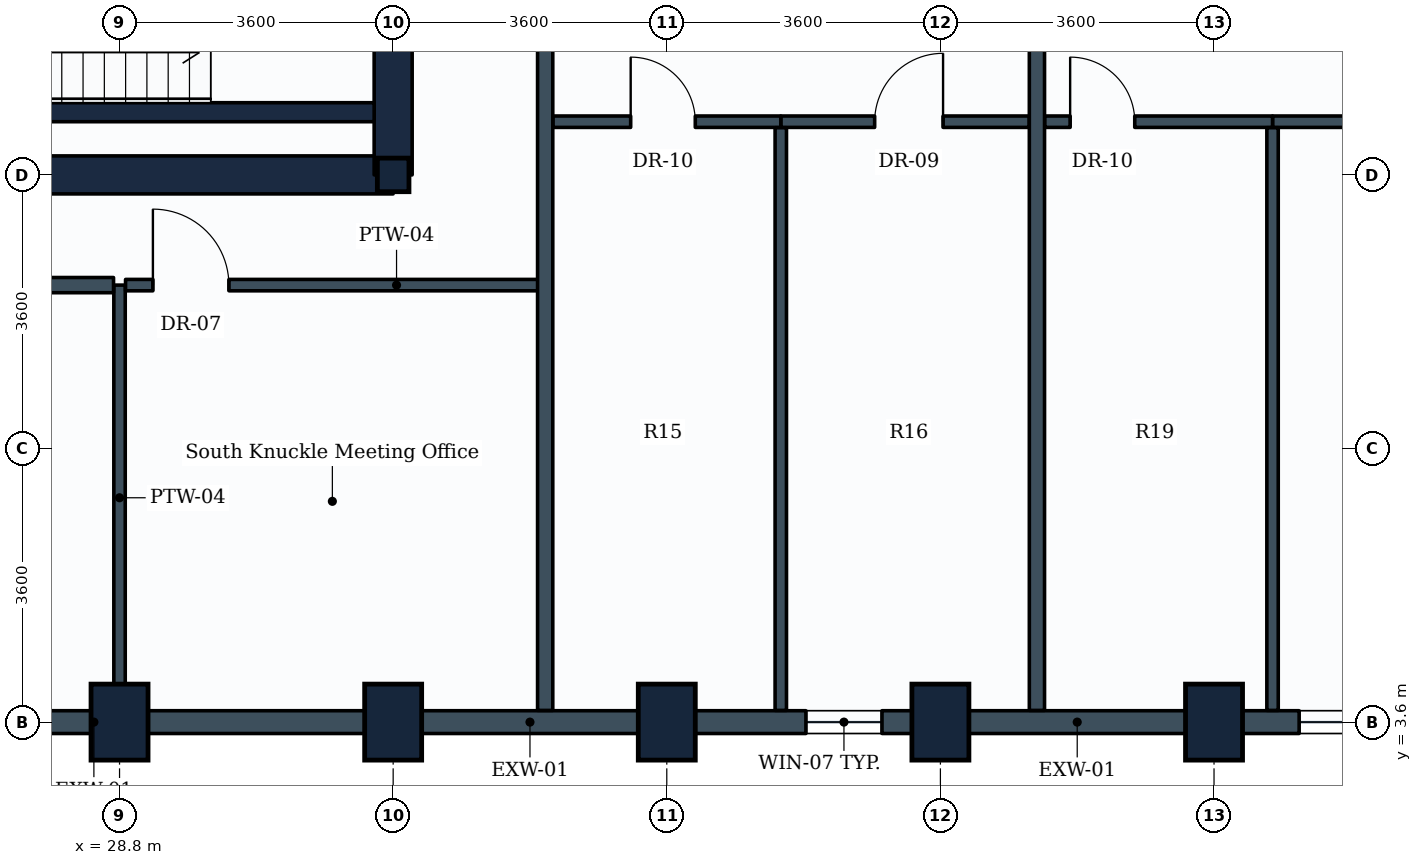
"""IFC4 building model, lengths in metres.
Left out: names, types, materials, properties, quantities, classifications, styles, units other than length and angle.
Written with IfcOpenShell. Run it as: python <this file> out.ifc"""

import sys

from ifc_helpers import new_model, si_unit, direction, frame, frame_2d, origin, origin_2d, place, context, subcontext, project, spatial, rectangle, i_section, extrude, element, fill, save


model = new_model("IFC4")
c1 = context("Model", 3, precision=1e-05, world=origin(), true_north=direction((0.0, 1.0)))
c2 = subcontext(c1, "Body", "Model", "MODEL_VIEW")
j1 = project(units=[si_unit("LENGTHUNIT", "METRE"), si_unit("PLANEANGLEUNIT", "RADIAN")], contexts=[c1])
p1 = place(None, origin())
s1 = spatial("IfcSite", under=j1, at=p1, CompositionType="ELEMENT")
p2 = place(p1, origin())
s2 = spatial("IfcBuilding", under=s1, at=p2, CompositionType="ELEMENT")
p3 = place(p2, frame((0.0, 0.0, 142.8)))
s3 = spatial("IfcBuildingStorey", under=s2, at=p3, CompositionType="ELEMENT", Elevation=142.8)
for number, where, z_axis, x_axis in (
    (1, (28.8, 3.6, 0.0), (0.0, 0.0, 1.0), (1.0, 0.0, 0.0)),
    (2, (32.4, 3.6, 0.0), (0.0, 0.0, 1.0), (1.0, 0.0, 0.0)),
):
    element("IfcColumn", number, at=place(p3, frame(where, z_axis=z_axis, x_axis=x_axis)), inside=s3, PredefinedType="COLUMN", context=c2, shape_type="SweptSolid", body=[
        extrude(rectangle(XDim=0.75, YDim=1.0, at=origin_2d()), origin(), (0.0, 0.0, 1.0), 3.8),
    ])
p4 = place(p3, frame((32.4, 10.8, 0.0), z_axis=(0.0, 0.0, 1.0), x_axis=(1.0, 0.0, 0.0)))
e3 = element("IfcColumn", 3, at=p4, inside=s3, PredefinedType="COLUMN", context=c2, shape_type="SweptSolid", body=[
    extrude(i_section(OverallWidth=0.416, OverallDepth=0.442, WebThickness=0.025, FlangeThickness=0.041, FilletRadius=0.015, at=origin_2d()), origin(), (0.0, 0.0, 1.0), 3.8),
])
for number, where, z_axis, x_axis in (
    (4, (36.0, 3.6, 0.0), (0.0, 0.0, 1.0), (1.0, 0.0, 0.0)),
    (5, (39.6, 3.6, 0.0), (0.0, 0.0, 1.0), (1.0, 0.0, 0.0)),
    (6, (43.2, 3.6, 0.0), (0.0, 0.0, 1.0), (1.0, 0.0, 0.0)),
):
    element("IfcColumn", number, at=place(p3, frame(where, z_axis=z_axis, x_axis=x_axis)), inside=s3, PredefinedType="COLUMN", context=c2, shape_type="SweptSolid", body=[
        extrude(rectangle(XDim=0.75, YDim=1.0, at=origin_2d()), origin(), (0.0, 0.0, 1.0), 3.8),
    ])
p5 = place(p3, frame((28.8, 3.6, 0.0), z_axis=(0.0, 0.0, 1.0), x_axis=(-1.0, 0.0, 0.0)))
e7 = element("IfcWall", 7, at=p5, inside=s3, PredefinedType="STANDARD", context=c2, shape_type="SweptSolid", body=[
    extrude(rectangle(XDim=3.6, YDim=0.3, at=frame_2d((1.8, 0.0))), origin(), (0.0, 0.0, 1.0), 2.93),
])
p6 = place(p5, frame((0.925, 0.0, 0.85)))
e8 = element("IfcOpeningElement", 8, at=p6, cuts=e7, PredefinedType="OPENING", context=c2, shape_type="SweptSolid", body=[
    extrude(rectangle(XDim=1.8, YDim=1.35, at=frame_2d((0.9, 0.675))), frame((0.0, 0.16, 0.0), z_axis=(0.0, -1.0, 0.0), x_axis=(1.0, 0.0, 0.0)), (0.0, 0.0, 1.0), 0.32),
])
p7 = place(p3, frame((32.4, 3.6, 0.0), z_axis=(0.0, 0.0, 1.0), x_axis=(-1.0, 0.0, 0.0)))
e9 = element("IfcWall", 9, at=p7, inside=s3, PredefinedType="STANDARD", context=c2, shape_type="SweptSolid", body=[
    extrude(rectangle(XDim=3.6, YDim=0.3, at=frame_2d((1.8, 0.0))), origin(), (0.0, 0.0, 1.0), 2.93),
])
p8 = place(p3, frame((36.0, 3.6, 0.0), z_axis=(0.0, 0.0, 1.0), x_axis=(-1.0, 0.0, 0.0)))
e10 = element("IfcWall", 10, at=p8, inside=s3, PredefinedType="STANDARD", context=c2, shape_type="SweptSolid", body=[
    extrude(rectangle(XDim=3.6, YDim=0.3, at=frame_2d((1.8, 0.0))), origin(), (0.0, 0.0, 1.0), 2.93),
])
p9 = place(p3, frame((39.6, 3.6, 0.0), z_axis=(0.0, 0.0, 1.0), x_axis=(-1.0, 0.0, 0.0)))
e11 = element("IfcWall", 11, at=p9, inside=s3, PredefinedType="STANDARD", context=c2, shape_type="SweptSolid", body=[
    extrude(rectangle(XDim=3.6, YDim=0.3, at=frame_2d((1.8, 0.0))), origin(), (0.0, 0.0, 1.0), 2.93),
])
p10 = place(p9, frame((0.769, 0.0, 0.85)))
e12 = element("IfcOpeningElement", 12, at=p10, cuts=e11, PredefinedType="OPENING", context=c2, shape_type="SweptSolid", body=[
    extrude(rectangle(XDim=1.0, YDim=1.35, at=frame_2d((0.5, 0.675))), frame((0.0, 0.16, 0.0), z_axis=(0.0, -1.0, 0.0), x_axis=(1.0, 0.0, 0.0)), (0.0, 0.0, 1.0), 0.32),
])
p11 = place(p3, frame((43.2, 3.6, 0.0), z_axis=(0.0, 0.0, 1.0), x_axis=(-1.0, 0.0, 0.0)))
e13 = element("IfcWall", 13, at=p11, inside=s3, PredefinedType="STANDARD", context=c2, shape_type="SweptSolid", body=[
    extrude(rectangle(XDim=3.6, YDim=0.3, at=frame_2d((1.8, 0.0))), origin(), (0.0, 0.0, 1.0), 2.93),
])
p12 = place(p3, frame((46.8, 3.6, 0.0), z_axis=(0.0, 0.0, 1.0), x_axis=(-1.0, 0.0, 0.0)))
e14 = element("IfcWall", 14, at=p12, inside=s3, PredefinedType="STANDARD", context=c2, shape_type="SweptSolid", body=[
    extrude(rectangle(XDim=3.6, YDim=0.3, at=frame_2d((1.8, 0.0))), origin(), (0.0, 0.0, 1.0), 2.93),
])
p13 = place(p12, frame((0.68, 0.0, 0.85)))
e15 = element("IfcOpeningElement", 15, at=p13, cuts=e14, PredefinedType="OPENING", context=c2, shape_type="SweptSolid", body=[
    extrude(rectangle(XDim=1.8, YDim=1.35, at=frame_2d((0.9, 0.675))), frame((0.0, 0.16, 0.0), z_axis=(0.0, -1.0, 0.0), x_axis=(1.0, 0.0, 0.0)), (0.0, 0.0, 1.0), 0.32),
])
p14 = place(p3, frame((14.4, 10.8, 0.0), z_axis=(0.0, 0.0, 1.0), x_axis=(1.0, 0.0, 0.0)))
e16 = element("IfcWall", 16, at=p14, inside=s3, PredefinedType="SHEAR", context=c2, shape_type="SweptSolid", body=[
    extrude(rectangle(XDim=18.0, YDim=0.5, at=frame_2d((9.0, 0.0))), origin(), (0.0, 0.0, 1.0), 3.55),
])
p15 = place(p3, frame((32.4, 10.8, 0.0), z_axis=(0.0, 0.0, 1.0), x_axis=(0.0, 1.0, 0.0)))
e17 = element("IfcWall", 17, at=p15, inside=s3, PredefinedType="SHEAR", context=c2, shape_type="SweptSolid", body=[
    extrude(rectangle(XDim=14.4, YDim=0.5, at=frame_2d((7.2, 0.0))), origin(), (0.0, 0.0, 1.0), 3.55),
])
p16 = place(p15, frame((4.35, 0.0, 0.0)))
e18 = element("IfcOpeningElement", 18, at=p16, cuts=e17, PredefinedType="OPENING", context=c2, shape_type="SweptSolid", body=[
    extrude(rectangle(XDim=1.2, YDim=2.1, at=frame_2d((0.6, 1.05))), frame((0.0, 0.26, 0.0), z_axis=(0.0, -1.0, 0.0), x_axis=(1.0, 0.0, 0.0)), (0.0, 0.0, 1.0), 0.52),
])
p17 = place(p15, frame((10.0, 0.0, 0.0)))
e19 = element("IfcOpeningElement", 19, at=p17, cuts=e17, PredefinedType="OPENING", context=c2, shape_type="SweptSolid", body=[
    extrude(rectangle(XDim=1.2, YDim=2.1, at=frame_2d((0.6, 1.05))), frame((0.0, 0.26, 0.0), z_axis=(0.0, -1.0, 0.0), x_axis=(1.0, 0.0, 0.0)), (0.0, 0.0, 1.0), 0.52),
])
p18 = place(p3, frame((23.35, 11.625, 0.0), z_axis=(0.0, 0.0, 1.0), x_axis=(1.0, 0.0, 0.0)))
e20 = element("IfcWall", 20, at=p18, inside=s3, PredefinedType="SHEAR", context=c2, shape_type="SweptSolid", body=[
    extrude(rectangle(XDim=8.8, YDim=0.25, at=frame_2d((4.4, 0.0))), origin(), (0.0, 0.0, 1.0), 3.55),
])
p19 = place(p3, frame((28.8, 9.35, 0.0), z_axis=(0.0, 0.0, 1.0), x_axis=(0.0, -1.0, 0.0)))
e21 = element("IfcWall", 21, at=p19, inside=s3, PredefinedType="PARTITIONING", context=c2, shape_type="SweptSolid", body=[
    extrude(rectangle(XDim=5.596, YDim=0.15, at=frame_2d((2.798, 0.0))), origin(), (0.0, 0.0, 1.0), 3.535),
])
p20 = place(p3, frame((20.504, 9.35, 0.0), z_axis=(0.0, 0.0, 1.0), x_axis=(1.0, 0.0, 0.0)))
e22 = element("IfcWall", 22, at=p20, inside=s3, PredefinedType="PARTITIONING", context=c2, shape_type="SweptSolid", body=[
    extrude(rectangle(XDim=8.217, YDim=0.2, at=frame_2d((4.108, 0.0))), origin(), (0.0, 0.0, 1.0), 3.17),
])
p21 = place(p20, frame((3.914, 0.0, 0.0)))
e23 = element("IfcOpeningElement", 23, at=p21, cuts=e22, PredefinedType="OPENING", context=c2, shape_type="SweptSolid", body=[
    extrude(rectangle(XDim=1.0, YDim=2.1, at=frame_2d((0.5, 1.05))), frame((0.0, 0.11, 0.0), z_axis=(0.0, -1.0, 0.0), x_axis=(1.0, 0.0, 0.0)), (0.0, 0.0, 1.0), 0.22),
])
p22 = place(p3, frame((28.879, 9.35, 0.0), z_axis=(0.0, 0.0, 1.0), x_axis=(1.0, 0.0, 0.0)))
e24 = element("IfcWall", 24, at=p22, inside=s3, PredefinedType="PARTITIONING", context=c2, shape_type="SweptSolid", body=[
    extrude(rectangle(XDim=5.521, YDim=0.15, at=frame_2d((2.76, 0.0))), origin(), (0.0, 0.0, 1.0), 3.535),
])
p23 = place(p22, frame((0.36, 0.0, 0.0)))
e25 = element("IfcOpeningElement", 25, at=p23, cuts=e24, PredefinedType="OPENING", context=c2, shape_type="SweptSolid", body=[
    extrude(rectangle(XDim=1.0, YDim=2.1, at=frame_2d((0.5, 1.05))), frame((0.0, 0.085, 0.0), z_axis=(0.0, -1.0, 0.0), x_axis=(1.0, 0.0, 0.0)), (0.0, 0.0, 1.0), 0.17),
])
for number, where, z_axis, x_axis in (
    (26, (34.4, 3.754, 0.0), (0.0, 0.0, 1.0), (0.0, 1.0, 0.0)),
    (27, (40.87, 3.754, 0.0), (0.0, 0.0, 1.0), (0.0, 1.0, 0.0)),
):
    element("IfcWall", number, at=place(p3, frame(where, z_axis=z_axis, x_axis=x_axis)), inside=s3, PredefinedType="PARTITIONING", context=c2, shape_type="SweptSolid", body=[
        extrude(rectangle(XDim=14.096, YDim=0.2, at=frame_2d((7.048, 0.0))), origin(), (0.0, 0.0, 1.0), 2.93),
    ])
p24 = place(p3, frame((37.5, 11.5, 0.0), z_axis=(0.0, 0.0, 1.0), x_axis=(1.0, 0.0, 0.0)))
e28 = element("IfcWall", 28, at=p24, inside=s3, PredefinedType="PARTITIONING", context=c2, shape_type="SweptSolid", body=[
    extrude(rectangle(XDim=3.266, YDim=0.15, at=frame_2d((1.633, 0.0))), origin(), (0.0, 0.0, 1.0), 3.17),
])
p25 = place(p24, frame((1.235, 0.0, 0.0)))
e29 = element("IfcOpeningElement", 29, at=p25, cuts=e28, PredefinedType="OPENING", context=c2, shape_type="SweptSolid", body=[
    extrude(rectangle(XDim=0.9, YDim=2.1, at=frame_2d((0.45, 1.05))), frame((0.0, 0.085, 0.0), z_axis=(0.0, -1.0, 0.0), x_axis=(1.0, 0.0, 0.0)), (0.0, 0.0, 1.0), 0.17),
])
p26 = place(p3, frame((34.504, 11.5, 0.0), z_axis=(0.0, 0.0, 1.0), x_axis=(1.0, 0.0, 0.0)))
e30 = element("IfcWall", 30, at=p26, inside=s3, PredefinedType="PARTITIONING", context=c2, shape_type="SweptSolid", body=[
    extrude(rectangle(XDim=2.996, YDim=0.15, at=frame_2d((1.498, 0.0))), origin(), (0.0, 0.0, 1.0), 3.22),
])
p27 = place(p26, frame((1.021, 0.0, 0.0)))
e31 = element("IfcOpeningElement", 31, at=p27, cuts=e30, PredefinedType="OPENING", context=c2, shape_type="SweptSolid", body=[
    extrude(rectangle(XDim=0.85, YDim=2.1, at=frame_2d((0.425, 1.05))), frame((0.0, 0.085, 0.0), z_axis=(0.0, -1.0, 0.0), x_axis=(1.0, 0.0, 0.0)), (0.0, 0.0, 1.0), 0.17),
])
p28 = place(p3, frame((37.5, 3.754, 0.0), z_axis=(0.0, 0.0, 1.0), x_axis=(0.0, 1.0, 0.0)))
e32 = element("IfcWall", 32, at=p28, inside=s3, PredefinedType="PARTITIONING", context=c2, shape_type="SweptSolid", body=[
    extrude(rectangle(XDim=7.667, YDim=0.15, at=frame_2d((3.833, 0.0))), origin(), (0.0, 0.0, 1.0), 2.93),
])
p29 = place(p3, frame((43.97, 11.5, 0.0), z_axis=(0.0, 0.0, 1.0), x_axis=(1.0, 0.0, 0.0)))
e33 = element("IfcWall", 33, at=p29, inside=s3, PredefinedType="PARTITIONING", context=c2, shape_type="SweptSolid", body=[
    extrude(rectangle(XDim=3.266, YDim=0.15, at=frame_2d((1.633, 0.0))), origin(), (0.0, 0.0, 1.0), 3.17),
])
p30 = place(p29, frame((1.235, 0.0, 0.0)))
e34 = element("IfcOpeningElement", 34, at=p30, cuts=e33, PredefinedType="OPENING", context=c2, shape_type="SweptSolid", body=[
    extrude(rectangle(XDim=0.9, YDim=2.1, at=frame_2d((0.45, 1.05))), frame((0.0, 0.085, 0.0), z_axis=(0.0, -1.0, 0.0), x_axis=(1.0, 0.0, 0.0)), (0.0, 0.0, 1.0), 0.17),
])
p31 = place(p3, frame((40.974, 11.5, 0.0), z_axis=(0.0, 0.0, 1.0), x_axis=(1.0, 0.0, 0.0)))
e35 = element("IfcWall", 35, at=p31, inside=s3, PredefinedType="PARTITIONING", context=c2, shape_type="SweptSolid", body=[
    extrude(rectangle(XDim=2.996, YDim=0.15, at=frame_2d((1.498, 0.0))), origin(), (0.0, 0.0, 1.0), 3.18),
])
p32 = place(p31, frame((0.333, 0.0, 0.0)))
e36 = element("IfcOpeningElement", 36, at=p32, cuts=e35, PredefinedType="OPENING", context=c2, shape_type="SweptSolid", body=[
    extrude(rectangle(XDim=0.85, YDim=2.1, at=frame_2d((0.425, 1.05))), frame((0.0, 0.085, 0.0), z_axis=(0.0, -1.0, 0.0), x_axis=(1.0, 0.0, 0.0)), (0.0, 0.0, 1.0), 0.17),
])
p33 = place(p3, frame((43.97, 3.754, 0.0), z_axis=(0.0, 0.0, 1.0), x_axis=(0.0, 1.0, 0.0)))
e37 = element("IfcWall", 37, at=p33, inside=s3, PredefinedType="PARTITIONING", context=c2, shape_type="SweptSolid", body=[
    extrude(rectangle(XDim=7.667, YDim=0.15, at=frame_2d((3.833, 0.0))), origin(), (0.0, 0.0, 1.0), 2.93),
])
p34 = place(p13, origin())
e38 = element("IfcWindow", 38, at=p34, inside=s3, PartitioningType="SINGLE_PANEL", PredefinedType="WINDOW", context=c2, shape_type="SweptSolid", body=[
    extrude(rectangle(XDim=1.8, YDim=1.35, at=frame_2d((0.9, 0.675))), frame((0.0, 0.03, 0.0), z_axis=(0.0, -1.0, 0.0), x_axis=(1.0, 0.0, 0.0)), (0.0, 0.0, 1.0), 0.06),
])
fill(e15, e38)
p35 = place(p23, origin())
e39 = element("IfcDoor", 39, at=p35, inside=s3, OperationType="SINGLE_SWING_LEFT", PredefinedType="DOOR", context=c2, shape_type="SweptSolid", body=[
    extrude(rectangle(XDim=1.0, YDim=2.1, at=frame_2d((0.5, 1.05))), frame((0.0, 0.025, 0.0), z_axis=(0.0, -1.0, 0.0), x_axis=(1.0, 0.0, 0.0)), (0.0, 0.0, 1.0), 0.05),
])
fill(e25, e39)
p36 = place(p25, origin())
e40 = element("IfcDoor", 40, at=p36, inside=s3, OperationType="SINGLE_SWING_RIGHT", PredefinedType="DOOR", context=c2, shape_type="SweptSolid", body=[
    extrude(rectangle(XDim=0.9, YDim=2.1, at=frame_2d((0.45, 1.05))), frame((0.0, 0.025, 0.0), z_axis=(0.0, -1.0, 0.0), x_axis=(1.0, 0.0, 0.0)), (0.0, 0.0, 1.0), 0.05),
])
fill(e29, e40)
p37 = place(p27, origin())
e41 = element("IfcDoor", 41, at=p37, inside=s3, OperationType="SINGLE_SWING_LEFT", PredefinedType="DOOR", context=c2, shape_type="SweptSolid", body=[
    extrude(rectangle(XDim=0.85, YDim=2.1, at=frame_2d((0.425, 1.05))), frame((0.0, 0.025, 0.0), z_axis=(0.0, -1.0, 0.0), x_axis=(1.0, 0.0, 0.0)), (0.0, 0.0, 1.0), 0.05),
])
fill(e31, e41)
p38 = place(p32, origin())
e42 = element("IfcDoor", 42, at=p38, inside=s3, OperationType="SINGLE_SWING_LEFT", PredefinedType="DOOR", context=c2, shape_type="SweptSolid", body=[
    extrude(rectangle(XDim=0.85, YDim=2.1, at=frame_2d((0.425, 1.05))), frame((0.0, 0.025, 0.0), z_axis=(0.0, -1.0, 0.0), x_axis=(1.0, 0.0, 0.0)), (0.0, 0.0, 1.0), 0.05),
])
fill(e36, e42)
p39 = place(p10, origin())
e43 = element("IfcWindow", 43, at=p39, inside=s3, PartitioningType="SINGLE_PANEL", PredefinedType="WINDOW", context=c2, shape_type="SweptSolid", body=[
    extrude(rectangle(XDim=1.0, YDim=1.35, at=frame_2d((0.5, 0.675))), frame((0.0, 0.03, 0.0), z_axis=(0.0, -1.0, 0.0), x_axis=(1.0, 0.0, 0.0)), (0.0, 0.0, 1.0), 0.06),
])
fill(e12, e43)
save(model, sys.argv[1])
